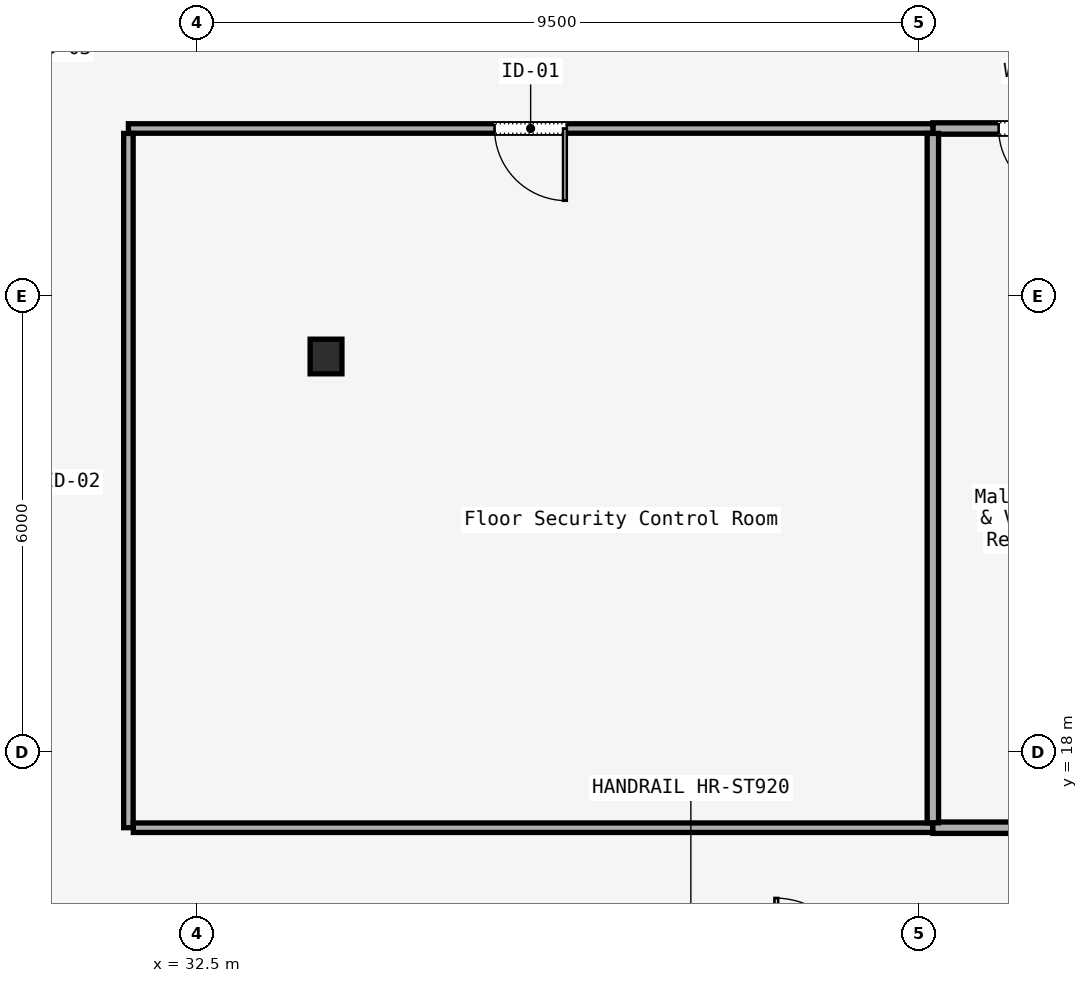
"""IFC4 building model, lengths in metres.
Left out: names, types, materials, properties, quantities, classifications, styles, units other than length and angle.
Written with IfcOpenShell. Run it as: python <this file> out.ifc"""

import sys

from ifc_helpers import new_model, si_unit, direction, frame, frame_2d, origin, origin_2d, place, context, subcontext, project, spatial, rectangle, i_section, extrude, element, fill, save


model = new_model("IFC4")
c1 = context("Model", 3, precision=1e-05, world=origin(), true_north=direction((0.0, 1.0)))
c2 = subcontext(c1, "Body", "Model", "MODEL_VIEW")
j1 = project(units=[si_unit("LENGTHUNIT", "METRE"), si_unit("PLANEANGLEUNIT", "RADIAN")], contexts=[c1])
p1 = place(None, origin())
s1 = spatial("IfcSite", under=j1, at=p1, CompositionType="ELEMENT")
p2 = place(p1, origin())
s2 = spatial("IfcBuilding", under=s1, at=p2, CompositionType="ELEMENT")
p3 = place(p2, frame((0.0, 0.0, 62.6)))
s3 = spatial("IfcBuildingStorey", under=s2, at=p3, CompositionType="ELEMENT", Elevation=62.6)
p4 = place(p3, frame((34.2, 23.2, 0.0), z_axis=(0.0, 0.0, 1.0), x_axis=(1.0, 0.0, 0.0)))
e1 = element("IfcColumn", 1, at=p4, inside=s3, PredefinedType="COLUMN", context=c2, shape_type="SweptSolid", body=[
    extrude(i_section(OverallWidth=0.418, OverallDepth=0.456, WebThickness=0.042, FlangeThickness=0.067, FilletRadius=0.015, at=origin_2d()), origin(), (0.0, 0.0, 1.0), 3.58),
])
p5 = place(p3, frame((44.815, 26.2, 0.0), z_axis=(0.0, 0.0, 1.0), x_axis=(-1.0, 0.0, 0.0)))
e2 = element("IfcWall", 2, at=p5, inside=s3, PredefinedType="PARTITIONING", context=c2, shape_type="SweptSolid", body=[
    extrude(rectangle(XDim=2.631, YDim=0.15, at=frame_2d((1.315, 0.0))), origin(), (0.0, 0.0, 1.0), 2.933),
])
p6 = place(p5, frame((0.865, 0.0, 0.0)))
e3 = element("IfcOpeningElement", 3, at=p6, cuts=e2, PredefinedType="OPENING", context=c2, shape_type="SweptSolid", body=[
    extrude(rectangle(XDim=0.9, YDim=2.15, at=frame_2d((0.45, 1.075))), frame((0.0, 0.075, 0.0), z_axis=(0.0, -1.0, 0.0), x_axis=(1.0, 0.0, 0.0)), (0.0, 0.0, 1.0), 0.15),
])
p7 = place(p3, frame((42.184, 26.2, 0.0), z_axis=(0.0, 0.0, 1.0), x_axis=(-1.0, 0.0, 0.0)))
e4 = element("IfcWall", 4, at=p7, inside=s3, PredefinedType="PARTITIONING", context=c2, shape_type="SweptSolid", body=[
    extrude(rectangle(XDim=10.584, YDim=0.125, at=frame_2d((5.292, 0.0))), origin(), (0.0, 0.0, 1.0), 2.933),
])
p8 = place(p7, frame((4.817, 0.0, 0.0)))
e5 = element("IfcOpeningElement", 5, at=p8, cuts=e4, PredefinedType="OPENING", context=c2, shape_type="SweptSolid", body=[
    extrude(rectangle(XDim=0.95, YDim=2.2, at=frame_2d((0.475, 1.1))), frame((0.0, 0.062, 0.0), z_axis=(0.0, -1.0, 0.0), x_axis=(1.0, 0.0, 0.0)), (0.0, 0.0, 1.0), 0.125),
])
p9 = place(p3, frame((31.6, 26.135, 0.0), z_axis=(0.0, 0.0, 1.0), x_axis=(0.0, -1.0, 0.0)))
e6 = element("IfcWall", 6, at=p9, inside=s3, PredefinedType="PARTITIONING", context=c2, shape_type="SweptSolid", body=[
    extrude(rectangle(XDim=9.135, YDim=0.125, at=frame_2d((4.567, 0.0))), origin(), (0.0, 0.0, 1.0), 2.933),
])
p10 = place(p3, frame((31.665, 17.0, 0.0), z_axis=(0.0, 0.0, 1.0), x_axis=(1.0, 0.0, 0.0)))
e7 = element("IfcWall", 7, at=p10, inside=s3, PredefinedType="PARTITIONING", context=c2, shape_type="SweptSolid", body=[
    extrude(rectangle(XDim=10.519, YDim=0.125, at=frame_2d((5.26, 0.0))), origin(), (0.0, 0.0, 1.0), 2.933),
])
p11 = place(p3, frame((42.184, 17.0, 0.0), z_axis=(0.0, 0.0, 1.0), x_axis=(1.0, 0.0, 0.0)))
e8 = element("IfcWall", 8, at=p11, inside=s3, PredefinedType="PARTITIONING", context=c2, shape_type="SweptSolid", body=[
    extrude(rectangle(XDim=2.631, YDim=0.15, at=frame_2d((1.315, 0.0))), origin(), (0.0, 0.0, 1.0), 2.933),
])
p12 = place(p3, frame((42.184, 26.135, 0.0), z_axis=(0.0, 0.0, 1.0), x_axis=(0.0, -1.0, 0.0)))
e9 = element("IfcWall", 9, at=p12, inside=s3, PredefinedType="PARTITIONING", context=c2, shape_type="SweptSolid", body=[
    extrude(rectangle(XDim=9.07, YDim=0.15, at=frame_2d((4.535, 0.0))), origin(), (0.0, 0.0, 1.0), 2.933),
])
p13 = place(p8, origin())
e10 = element("IfcDoor", 10, at=p13, inside=s3, OperationType="SINGLE_SWING_LEFT", PredefinedType="DOOR", context=c2, shape_type="SweptSolid", body=[
    extrude(rectangle(XDim=0.95, YDim=2.2, at=frame_2d((0.475, 1.1))), frame((0.0, 0.025, 0.0), z_axis=(0.0, -1.0, 0.0), x_axis=(1.0, 0.0, 0.0)), (0.0, 0.0, 1.0), 0.05),
])
fill(e5, e10)
p14 = place(p6, origin())
e11 = element("IfcDoor", 11, at=p14, inside=s3, OperationType="SINGLE_SWING_RIGHT", PredefinedType="DOOR", context=c2, shape_type="SweptSolid", body=[
    extrude(rectangle(XDim=0.9, YDim=2.15, at=frame_2d((0.45, 1.075))), frame((0.0, 0.025, 0.0), z_axis=(0.0, -1.0, 0.0), x_axis=(1.0, 0.0, 0.0)), (0.0, 0.0, 1.0), 0.05),
])
fill(e3, e11)
save(model, sys.argv[1])
